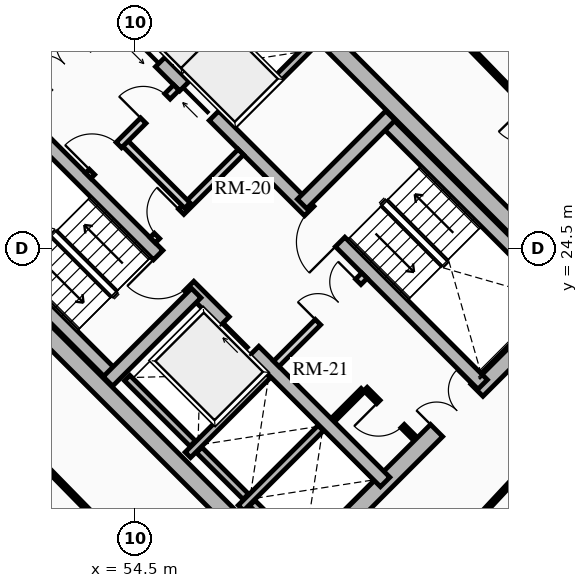
"""IFC4 building model, lengths in metres.
Left out: names, types, materials, properties, quantities, classifications, styles, units other than length and angle.
Written with IfcOpenShell. Run it as: python <this file> out.ifc"""

import sys

from ifc_helpers import new_model, si_unit, direction, frame, frame_2d, origin, place, context, subcontext, project, spatial, rectangle, extrude, source, transform, mapped, element, fill, save


model = new_model("IFC4")
c1 = context("Model", 3, precision=1e-05, world=origin(), true_north=direction((0.0, 1.0)))
c2 = subcontext(c1, "Body", "Model", "MODEL_VIEW")
j1 = project(units=[si_unit("LENGTHUNIT", "METRE"), si_unit("PLANEANGLEUNIT", "RADIAN")], contexts=[c1])
p1 = place(None, origin())
s1 = spatial("IfcSite", under=j1, at=p1, CompositionType="ELEMENT")
p2 = place(p1, origin())
s2 = spatial("IfcBuilding", under=s1, at=p2, CompositionType="ELEMENT")
p3 = place(p2, frame((0.0, 0.0, 96.34)))
s3 = spatial("IfcBuildingStorey", under=s2, at=p3, CompositionType="ELEMENT", Elevation=96.34)
for number, where, z_axis, x_axis in (
    (1, (58.737, 15.697, 0.0), (0.0, 0.0, 1.0), (-0.707, 0.707, 0.0)),
    (2, (66.303, 23.263, 0.0), (0.0, 0.0, 1.0), (-0.707, 0.707, 0.0)),
):
    element("IfcWall", number, at=place(p3, frame(where, z_axis=z_axis, x_axis=x_axis)), inside=s3, PredefinedType="SHEAR", context=c2, shape_type="SweptSolid", body=[
        extrude(rectangle(XDim=14.2, YDim=0.45, at=frame_2d((7.1, 0.0))), origin(), (0.0, 0.0, 1.0), 2.91),
    ])
p4 = place(p3, frame((58.578, 15.856, 0.0), z_axis=(0.0, 0.0, 1.0), x_axis=(0.707106781187, 0.707106781187, 0.0)))
e3 = element("IfcWall", 3, at=p4, inside=s3, PredefinedType="SHEAR", context=c2, shape_type="SweptSolid", body=[
    extrude(rectangle(XDim=10.7, YDim=0.45, at=frame_2d((5.35, 0.0))), origin(), (0.0, 0.0, 1.0), 2.91),
])
m1 = source(origin(), c2, "Body", "SweptSolid", [
    extrude(rectangle(XDim=1.5, YDim=2.02, at=frame_2d((0.75, 1.01))), frame((0.0, 0.235, 0.0), z_axis=(0.0, -1.0, 0.0), x_axis=(1.0, 0.0, 0.0)), (0.0, 0.0, 1.0), 0.47),
])
p5 = place(p4, frame((5.45, 0.0, 0.0)))
e4 = element("IfcOpeningElement", 4, at=p5, cuts=e3, PredefinedType="OPENING", context=c2, shape_type="MappedRepresentation", body=[
    mapped(m1, transform((0.0, 0.0, 0.0), x_axis=(1.0, 0.0, 0.0), y_axis=(0.0, 1.0, 0.0), z_axis=(0.0, 0.0, 1.0), scale=1.0)),
])
p6 = place(p3, frame((48.856, 25.578, 0.0), z_axis=(0.0, 0.0, 1.0), x_axis=(0.707106781187, 0.707106781187, 0.0)))
e5 = element("IfcWall", 5, at=p6, inside=s3, PredefinedType="SHEAR", context=c2, shape_type="SweptSolid", body=[
    extrude(rectangle(XDim=10.7, YDim=0.45, at=frame_2d((5.35, 0.0))), origin(), (0.0, 0.0, 1.0), 2.91),
])
p7 = place(p6, frame((4.6, 0.0, 0.0)))
e6 = element("IfcOpeningElement", 6, at=p7, cuts=e5, PredefinedType="OPENING", context=c2, shape_type="MappedRepresentation", body=[
    mapped(m1, transform((0.0, 0.0, 0.0), x_axis=(1.0, 0.0, 0.0), y_axis=(0.0, 1.0, 0.0), z_axis=(0.0, 0.0, 1.0), scale=1.0)),
])
p8 = place(p3, frame((61.078, 18.355, 0.0), z_axis=(0.0, 0.0, 1.0), x_axis=(-0.707106781187, 0.707106781187, 0.0)))
e7 = element("IfcWall", 7, at=p8, inside=s3, PredefinedType="SHEAR", context=c2, shape_type="SweptSolid", body=[
    extrude(rectangle(XDim=13.75, YDim=0.35, at=frame_2d((6.875, 0.0))), origin(), (0.0, 0.0, 1.0), 2.91),
])
m2 = source(origin(), c2, "Body", "SweptSolid", [
    extrude(rectangle(XDim=1.1, YDim=2.015, at=frame_2d((0.55, 1.007))), frame((0.0, 0.185, 0.0), z_axis=(0.0, -1.0, 0.0), x_axis=(1.0, 0.0, 0.0)), (0.0, 0.0, 1.0), 0.37),
])
p9 = place(p8, frame((4.875, 0.0, 0.0)))
e8 = element("IfcOpeningElement", 8, at=p9, cuts=e7, PredefinedType="OPENING", context=c2, shape_type="MappedRepresentation", body=[
    mapped(m2, transform((0.0, 0.0, 0.0), x_axis=(1.0, 0.0, 0.0), y_axis=(0.0, 1.0, 0.0), z_axis=(0.0, 0.0, 1.0), scale=1.0)),
])
m3 = source(origin(), c2, "Body", "SweptSolid", [
    extrude(rectangle(XDim=1.15, YDim=2.02, at=frame_2d((0.575, 1.01))), frame((0.0, 0.185, 0.0), z_axis=(0.0, -1.0, 0.0), x_axis=(1.0, 0.0, 0.0)), (0.0, 0.0, 1.0), 0.37),
])
p10 = place(p8, frame((7.295, 0.0, 0.0)))
e9 = element("IfcOpeningElement", 9, at=p10, cuts=e7, PredefinedType="OPENING", context=c2, shape_type="MappedRepresentation", body=[
    mapped(m3, transform((0.0, 0.0, 0.0), x_axis=(1.0, 0.0, 0.0), y_axis=(0.0, 1.0, 0.0), z_axis=(0.0, 0.0, 1.0), scale=1.0)),
])
p11 = place(p3, frame((63.645, 20.922, 0.0), z_axis=(0.0, 0.0, 1.0), x_axis=(-0.707106781187, 0.707106781187, 0.0)))
e10 = element("IfcWall", 10, at=p11, inside=s3, PredefinedType="SHEAR", context=c2, shape_type="SweptSolid", body=[
    extrude(rectangle(XDim=13.75, YDim=0.35, at=frame_2d((6.875, 0.0))), origin(), (0.0, 0.0, 1.0), 2.91),
])
p12 = place(p11, frame((10.0, 0.0, 0.0)))
e11 = element("IfcOpeningElement", 11, at=p12, cuts=e10, PredefinedType="OPENING", context=c2, shape_type="MappedRepresentation", body=[
    mapped(m2, transform((0.0, 0.0, 0.0), x_axis=(1.0, 0.0, 0.0), y_axis=(0.0, 1.0, 0.0), z_axis=(0.0, 0.0, 1.0), scale=1.0)),
])
p13 = place(p11, frame((12.0, 0.0, 0.0)))
e12 = element("IfcOpeningElement", 12, at=p13, cuts=e10, PredefinedType="OPENING", context=c2, shape_type="MappedRepresentation", body=[
    mapped(m2, transform((0.0, 0.0, 0.0), x_axis=(1.0, 0.0, 0.0), y_axis=(0.0, 1.0, 0.0), z_axis=(0.0, 0.0, 1.0), scale=1.0)),
])
p14 = place(p11, frame((5.305, 0.0, 0.0)))
e13 = element("IfcOpeningElement", 13, at=p14, cuts=e10, PredefinedType="OPENING", context=c2, shape_type="MappedRepresentation", body=[
    mapped(m3, transform((0.0, 0.0, 0.0), x_axis=(1.0, 0.0, 0.0), y_axis=(0.0, 1.0, 0.0), z_axis=(0.0, 0.0, 1.0), scale=1.0)),
])
p15 = place(p3, frame((53.922, 21.141, 0.0), z_axis=(0.0, 0.0, 1.0), x_axis=(-0.707088616009, 0.707124945897, 0.0)))
e14 = element("IfcWall", 14, at=p15, inside=s3, PredefinedType="SHEAR", context=c2, shape_type="SweptSolid", body=[
    extrude(rectangle(XDim=6.72, YDim=0.35, at=frame_2d((3.36, 0.0))), origin(), (0.0, 0.0, 1.0), 2.91),
])
p16 = place(p3, frame((53.784, 21.003, 0.0), z_axis=(0.0, 0.0, 1.0), x_axis=(0.707106781187, 0.707106781187, 0.0)))
e15 = element("IfcWall", 15, at=p16, inside=s3, PredefinedType="SHEAR", context=c2, shape_type="SweptSolid", body=[
    extrude(rectangle(XDim=3.285, YDim=0.35, at=frame_2d((1.643, 0.0))), origin(), (0.0, 0.0, 1.0), 2.91),
])
p17 = place(p3, frame((65.83, 23.107, 0.0), z_axis=(0.0, 0.0, 1.0), x_axis=(-0.707088616009, 0.707124945897, 0.0)))
e16 = element("IfcWall", 16, at=p17, inside=s3, PredefinedType="SHEAR", context=c2, shape_type="SweptSolid", body=[
    extrude(rectangle(XDim=6.72, YDim=0.35, at=frame_2d((3.36, 0.0))), origin(), (0.0, 0.0, 1.0), 2.91),
])
p18 = place(p3, frame((58.893, 25.674, 0.0), z_axis=(0.0, 0.0, 1.0), x_axis=(0.707106781187, 0.707106781187, 0.0)))
e17 = element("IfcWall", 17, at=p18, inside=s3, PredefinedType="SHEAR", context=c2, shape_type="SweptSolid", body=[
    extrude(rectangle(XDim=3.285, YDim=0.35, at=frame_2d((1.643, 0.0))), origin(), (0.0, 0.0, 1.0), 2.91),
])
p19 = place(p3, frame((55.888, 19.069, 0.0), z_axis=(0.0, 0.0, 1.0), x_axis=(0.707106781187, 0.707106781187, 0.0)))
e18 = element("IfcWall", 18, at=p19, inside=s3, PredefinedType="SHEAR", context=c2, shape_type="SweptSolid", body=[
    extrude(rectangle(XDim=2.97, YDim=0.2, at=frame_2d((1.485, 0.0))), origin(), (0.0, 0.0, 1.0), 2.91),
])
p20 = place(p3, frame((56.015, 19.366, 0.0), z_axis=(0.0, 0.0, 1.0), x_axis=(-0.707106781187, 0.707106781187, 0.0)))
e19 = element("IfcWall", 19, at=p20, inside=s3, PredefinedType="SHEAR", context=c2, shape_type="SweptSolid", body=[
    extrude(rectangle(XDim=2.44, YDim=0.2, at=frame_2d((1.22, 0.0))), origin(), (0.0, 0.0, 1.0), 2.91),
])
p21 = place(p3, frame((57.284, 17.673, 0.0), z_axis=(0.0, 0.0, 1.0), x_axis=(0.707147878904, 0.70706568108, 0.0)))
e20 = element("IfcWall", 20, at=p21, inside=s3, PredefinedType="SHEAR", context=c2, shape_type="SweptSolid", body=[
    extrude(rectangle(XDim=2.97, YDim=0.2, at=frame_2d((1.485, 0.0))), origin(), (0.0, 0.0, 1.0), 2.91),
])
p22 = place(p3, frame((57.412, 17.97, 0.0), z_axis=(0.0, 0.0, 1.0), x_axis=(-0.707106781187, 0.707106781187, 0.0)))
e21 = element("IfcWall", 21, at=p22, inside=s3, PredefinedType="SHEAR", context=c2, shape_type="SweptSolid", body=[
    extrude(rectangle(XDim=1.735, YDim=0.2, at=frame_2d((0.867, 0.0))), origin(), (0.0, 0.0, 1.0), 2.91),
])
p23 = place(p3, frame((58.737, 16.644, 0.0), z_axis=(0.0, 0.0, 1.0), x_axis=(-0.707032117043, 0.707181437447, 0.0)))
e22 = element("IfcWall", 22, at=p23, inside=s3, PredefinedType="SHEAR", context=c2, shape_type="SweptSolid", body=[
    extrude(rectangle(XDim=1.635, YDim=0.2, at=frame_2d((0.817, 0.0))), origin(), (0.0, 0.0, 1.0), 2.91),
])
p24 = place(p3, frame((57.062, 27.781, 0.0), z_axis=(0.0, 0.0, 1.0), x_axis=(0.707106781187, 0.707106781187, 0.0)))
e23 = element("IfcWall", 23, at=p24, inside=s3, PredefinedType="SHEAR", context=c2, shape_type="SweptSolid", body=[
    extrude(rectangle(XDim=2.97, YDim=0.2, at=frame_2d((1.485, 0.0))), origin(), (0.0, 0.0, 1.0), 2.91),
])
p25 = place(p3, frame((55.615, 29.227, 0.0), z_axis=(0.0, 0.0, 1.0), x_axis=(0.707147878904, 0.70706568108, 0.0)))
e24 = element("IfcWall", 24, at=p25, inside=s3, PredefinedType="SHEAR", context=c2, shape_type="SweptSolid", body=[
    extrude(rectangle(XDim=2.97, YDim=0.2, at=frame_2d((1.485, 0.0))), origin(), (0.0, 0.0, 1.0), 2.91),
])
p26 = place(p3, frame((58.214, 21.467, 0.0), z_axis=(0.0, 0.0, 1.0), x_axis=(0.707106781187, 0.707106781187, 0.0)))
e25 = element("IfcWall", 25, at=p26, inside=s3, PredefinedType="PARTITIONING", context=c2, shape_type="SweptSolid", body=[
    extrude(rectangle(XDim=3.28, YDim=0.2, at=frame_2d((1.64, 0.0))), origin(), (0.0, 0.0, 1.0), 2.655),
])
m4 = source(origin(), c2, "Body", "SweptSolid", [
    extrude(rectangle(XDim=1.5, YDim=2.02, at=frame_2d((0.75, 1.01))), frame((0.0, 0.11, 0.0), z_axis=(0.0, -1.0, 0.0), x_axis=(1.0, 0.0, 0.0)), (0.0, 0.0, 1.0), 0.22),
])
p27 = place(p26, frame((1.55, 0.0, 0.0)))
e26 = element("IfcOpeningElement", 26, at=p27, cuts=e25, PredefinedType="OPENING", context=c2, shape_type="MappedRepresentation", body=[
    mapped(m4, transform((0.0, 0.0, 0.0), x_axis=(1.0, 0.0, 0.0), y_axis=(0.0, 1.0, 0.0), z_axis=(0.0, 0.0, 1.0), scale=1.0)),
])
p28 = place(p3, frame((54.961, 24.719, 0.0), z_axis=(0.0, 0.0, 1.0), x_axis=(0.707106781187, 0.707106781187, 0.0)))
e27 = element("IfcWall", 27, at=p28, inside=s3, PredefinedType="PARTITIONING", context=c2, shape_type="SweptSolid", body=[
    extrude(rectangle(XDim=3.28, YDim=0.2, at=frame_2d((1.64, 0.0))), origin(), (0.0, 0.0, 1.0), 2.655),
])
m5 = source(origin(), c2, "Body", "SweptSolid", [
    extrude(rectangle(XDim=0.9, YDim=2.005, at=frame_2d((0.45, 1.002))), frame((0.0, 0.11, 0.0), z_axis=(0.0, -1.0, 0.0), x_axis=(1.0, 0.0, 0.0)), (0.0, 0.0, 1.0), 0.22),
])
p29 = place(p28, frame((0.16, 0.0, 0.0)))
e28 = element("IfcOpeningElement", 28, at=p29, cuts=e27, PredefinedType="OPENING", context=c2, shape_type="MappedRepresentation", body=[
    mapped(m5, transform((0.0, 0.0, 0.0), x_axis=(1.0, 0.0, 0.0), y_axis=(0.0, 1.0, 0.0), z_axis=(0.0, 0.0, 1.0), scale=1.0)),
])
p30 = place(p3, frame((55.874, 25.631, 0.0), z_axis=(0.0, 0.0, 1.0), x_axis=(-0.707157639372, 0.707055919343, 0.0)))
e29 = element("IfcWall", 29, at=p30, inside=s3, PredefinedType="PARTITIONING", context=c2, shape_type="SweptSolid", body=[
    extrude(rectangle(XDim=2.4, YDim=0.2, at=frame_2d((1.2, 0.0))), origin(), (0.0, 0.0, 1.0), 2.655),
])
p31 = place(p3, frame((53.264, 26.416, 0.0), z_axis=(0.0, 0.0, 1.0), x_axis=(0.707106781187, 0.707106781187, 0.0)))
e30 = element("IfcWall", 30, at=p31, inside=s3, PredefinedType="PARTITIONING", context=c2, shape_type="SweptSolid", body=[
    extrude(rectangle(XDim=3.28, YDim=0.2, at=frame_2d((1.64, 0.0))), origin(), (0.0, 0.0, 1.0), 2.655),
])
m6 = source(origin(), c2, "Body", "SweptSolid", [
    extrude(rectangle(XDim=1.0, YDim=2.015, at=frame_2d((0.5, 1.007))), frame((0.0, 0.11, 0.0), z_axis=(0.0, -1.0, 0.0), x_axis=(1.0, 0.0, 0.0)), (0.0, 0.0, 1.0), 0.22),
])
p32 = place(p31, frame((0.14, 0.0, 0.0)))
e31 = element("IfcOpeningElement", 31, at=p32, cuts=e30, PredefinedType="OPENING", context=c2, shape_type="MappedRepresentation", body=[
    mapped(m6, transform((0.0, 0.0, 0.0), x_axis=(1.0, 0.0, 0.0), y_axis=(0.0, 1.0, 0.0), z_axis=(0.0, 0.0, 1.0), scale=1.0)),
])
p33 = place(p31, frame((2.05, 0.0, 0.0)))
e32 = element("IfcOpeningElement", 32, at=p33, cuts=e30, PredefinedType="OPENING", context=c2, shape_type="MappedRepresentation", body=[
    mapped(m5, transform((0.0, 0.0, 0.0), x_axis=(1.0, 0.0, 0.0), y_axis=(0.0, 1.0, 0.0), z_axis=(0.0, 0.0, 1.0), scale=1.0)),
])
p34 = place(p3, frame((61.835, 19.529, 0.0), z_axis=(0.0, 0.0, 1.0), x_axis=(-0.707174592913, 0.707038962956, 0.0)))
e33 = element("IfcWall", 33, at=p34, inside=s3, PredefinedType="PARTITIONING", context=c2, shape_type="SweptSolid", body=[
    extrude(rectangle(XDim=1.8, YDim=0.125, at=frame_2d((0.9, 0.0))), origin(), (0.0, 0.0, 1.0), 2.655),
])
m7 = source(origin(), c2, "Body", "SweptSolid", [
    extrude(rectangle(XDim=0.9, YDim=2.005, at=frame_2d((0.45, 1.002))), frame((0.0, 0.073, 0.0), z_axis=(0.0, -1.0, 0.0), x_axis=(1.0, 0.0, 0.0)), (0.0, 0.0, 1.0), 0.145),
])
p35 = place(p34, frame((0.42, 0.0, 0.0)))
e34 = element("IfcOpeningElement", 34, at=p35, cuts=e33, PredefinedType="OPENING", context=c2, shape_type="MappedRepresentation", body=[
    mapped(m7, transform((0.0, 0.0, 0.0), x_axis=(1.0, 0.0, 0.0), y_axis=(0.0, 1.0, 0.0), z_axis=(0.0, 0.0, 1.0), scale=1.0)),
])
p36 = place(p3, frame((59.713, 19.996, 0.0), z_axis=(0.0, 0.0, 1.0), x_axis=(0.707217726, 0.706995818963, 0.0)))
e35 = element("IfcWall", 35, at=p36, inside=s3, PredefinedType="PARTITIONING", context=c2, shape_type="SweptSolid", body=[
    extrude(rectangle(XDim=1.1, YDim=0.125, at=frame_2d((0.55, 0.0))), origin(), (0.0, 0.0, 1.0), 2.655),
])
p37 = place(p3, frame((51.949, 18.949, 0.0), z_axis=(0.0, 0.0, 1.0), x_axis=(0.699840807936, -0.714298847506, 0.0)))
e36 = element("IfcWall", 36, at=p37, inside=s3, PredefinedType="MOVABLE", context=c2, shape_type="SweptSolid", body=[
    extrude(rectangle(XDim=6.13, YDim=0.1, at=frame_2d((3.065, 0.0))), origin(), (0.0, 0.0, 1.0), 2.225),
])
p38 = place(p3, frame((62.875, 16.709, 0.0), z_axis=(0.0, 0.0, 1.0), x_axis=(0.682290572861, 0.731081099595, 0.0)))
e37 = element("IfcWall", 37, at=p38, inside=s3, PredefinedType="MOVABLE", context=c2, shape_type="SweptSolid", body=[
    extrude(rectangle(XDim=6.6, YDim=0.1, at=frame_2d((3.3, 0.0))), origin(), (0.0, 0.0, 1.0), 2.225),
])
p39 = place(p3, frame((67.213, 25.768, 0.0), z_axis=(0.0, 0.0, 1.0), x_axis=(-0.696916079748, 0.717152687918, 0.0)))
e38 = element("IfcWall", 38, at=p39, inside=s3, PredefinedType="MOVABLE", context=c2, shape_type="SweptSolid", body=[
    extrude(rectangle(XDim=5.972, YDim=0.1, at=frame_2d((2.986, 0.0))), origin(), (0.0, 0.0, 1.0), 2.655),
])
m8 = source(origin(), c2, "Body", "SweptSolid", [
    extrude(rectangle(XDim=1.0, YDim=2.015, at=frame_2d((0.5, 1.007))), frame((0.0, 0.06, 0.0), z_axis=(0.0, -1.0, 0.0), x_axis=(1.0, 0.0, 0.0)), (0.0, 0.0, 1.0), 0.12),
])
p40 = place(p39, frame((2.486, 0.0, 0.0)))
e39 = element("IfcOpeningElement", 39, at=p40, cuts=e38, PredefinedType="OPENING", context=c2, shape_type="MappedRepresentation", body=[
    mapped(m8, transform((0.0, 0.0, 0.0), x_axis=(1.0, 0.0, 0.0), y_axis=(0.0, 1.0, 0.0), z_axis=(0.0, 0.0, 1.0), scale=1.0)),
])
m9 = source(origin(), c2, "Body", "SweptSolid", [
    extrude(rectangle(XDim=1.1, YDim=2.015, at=frame_2d((0.55, 1.007))), frame((0.0, 0.025, 0.0), z_axis=(0.0, -1.0, 0.0), x_axis=(1.0, 0.0, 0.0)), (0.0, 0.0, 1.0), 0.05),
])
p41 = place(p9, origin())
e40 = element("IfcDoor", 40, at=p41, inside=s3, OperationType="SLIDING_TO_RIGHT", PredefinedType="DOOR", context=c2, shape_type="MappedRepresentation", body=[
    mapped(m9, transform((0.0, 0.0, 0.0), x_axis=(1.0, 0.0, 0.0), y_axis=(0.0, 1.0, 0.0), z_axis=(0.0, 0.0, 1.0), scale=1.0)),
])
fill(e8, e40)
p42 = place(p12, origin())
e41 = element("IfcDoor", 41, at=p42, inside=s3, OperationType="SLIDING_TO_RIGHT", PredefinedType="DOOR", context=c2, shape_type="MappedRepresentation", body=[
    mapped(m9, transform((0.0, 0.0, 0.0), x_axis=(1.0, 0.0, 0.0), y_axis=(0.0, 1.0, 0.0), z_axis=(0.0, 0.0, 1.0), scale=1.0)),
])
fill(e11, e41)
p43 = place(p13, origin())
e42 = element("IfcDoor", 42, at=p43, inside=s3, OperationType="SLIDING_TO_LEFT", PredefinedType="DOOR", context=c2, shape_type="MappedRepresentation", body=[
    mapped(m9, transform((0.0, 0.0, 0.0), x_axis=(1.0, 0.0, 0.0), y_axis=(0.0, 1.0, 0.0), z_axis=(0.0, 0.0, 1.0), scale=1.0)),
])
fill(e12, e42)
m10 = source(origin(), c2, "Body", "SweptSolid", [
    extrude(rectangle(XDim=1.15, YDim=2.02, at=frame_2d((0.575, 1.01))), frame((0.0, 0.025, 0.0), z_axis=(0.0, -1.0, 0.0), x_axis=(1.0, 0.0, 0.0)), (0.0, 0.0, 1.0), 0.05),
])
p44 = place(p10, origin())
e43 = element("IfcDoor", 43, at=p44, inside=s3, OperationType="SINGLE_SWING_RIGHT", PredefinedType="DOOR", context=c2, shape_type="MappedRepresentation", body=[
    mapped(m10, transform((0.0, 0.0, 0.0), x_axis=(1.0, 0.0, 0.0), y_axis=(0.0, 1.0, 0.0), z_axis=(0.0, 0.0, 1.0), scale=1.0)),
])
fill(e9, e43)
p45 = place(p14, origin())
e44 = element("IfcDoor", 44, at=p45, inside=s3, OperationType="SINGLE_SWING_LEFT", PredefinedType="DOOR", context=c2, shape_type="MappedRepresentation", body=[
    mapped(m10, transform((0.0, 0.0, 0.0), x_axis=(1.0, 0.0, 0.0), y_axis=(0.0, 1.0, 0.0), z_axis=(0.0, 0.0, 1.0), scale=1.0)),
])
fill(e13, e44)
m11 = source(origin(), c2, "Body", "SweptSolid", [
    extrude(rectangle(XDim=1.5, YDim=2.02, at=frame_2d((0.75, 1.01))), frame((0.0, 0.025, 0.0), z_axis=(0.0, -1.0, 0.0), x_axis=(1.0, 0.0, 0.0)), (0.0, 0.0, 1.0), 0.05),
])
p46 = place(p7, origin())
e45 = element("IfcDoor", 45, at=p46, inside=s3, OperationType="DOUBLE_DOOR_SINGLE_SWING", PredefinedType="DOOR", context=c2, shape_type="MappedRepresentation", body=[
    mapped(m11, transform((0.0, 0.0, 0.0), x_axis=(1.0, 0.0, 0.0), y_axis=(0.0, 1.0, 0.0), z_axis=(0.0, 0.0, 1.0), scale=1.0)),
])
fill(e6, e45)
p47 = place(p5, origin())
e46 = element("IfcDoor", 46, at=p47, inside=s3, OperationType="DOUBLE_DOOR_SINGLE_SWING", PredefinedType="DOOR", context=c2, shape_type="MappedRepresentation", body=[
    mapped(m11, transform((0.0, 0.0, 0.0), x_axis=(1.0, 0.0, 0.0), y_axis=(0.0, 1.0, 0.0), z_axis=(0.0, 0.0, 1.0), scale=1.0)),
])
fill(e4, e46)
p48 = place(p27, origin())
e47 = element("IfcDoor", 47, at=p48, inside=s3, OperationType="DOUBLE_DOOR_SINGLE_SWING", PredefinedType="DOOR", context=c2, shape_type="MappedRepresentation", body=[
    mapped(m11, transform((0.0, 0.0, 0.0), x_axis=(1.0, 0.0, 0.0), y_axis=(0.0, 1.0, 0.0), z_axis=(0.0, 0.0, 1.0), scale=1.0)),
])
fill(e26, e47)
m12 = source(origin(), c2, "Body", "SweptSolid", [
    extrude(rectangle(XDim=0.9, YDim=2.005, at=frame_2d((0.45, 1.002))), frame((0.0, 0.025, 0.0), z_axis=(0.0, -1.0, 0.0), x_axis=(1.0, 0.0, 0.0)), (0.0, 0.0, 1.0), 0.05),
])
p49 = place(p29, origin())
e48 = element("IfcDoor", 48, at=p49, inside=s3, OperationType="SINGLE_SWING_RIGHT", PredefinedType="DOOR", context=c2, shape_type="MappedRepresentation", body=[
    mapped(m12, transform((0.0, 0.0, 0.0), x_axis=(1.0, 0.0, 0.0), y_axis=(0.0, 1.0, 0.0), z_axis=(0.0, 0.0, 1.0), scale=1.0)),
])
fill(e28, e48)
m13 = source(origin(), c2, "Body", "SweptSolid", [
    extrude(rectangle(XDim=1.0, YDim=2.015, at=frame_2d((0.5, 1.007))), frame((0.0, 0.025, 0.0), z_axis=(0.0, -1.0, 0.0), x_axis=(1.0, 0.0, 0.0)), (0.0, 0.0, 1.0), 0.05),
])
p50 = place(p32, origin())
e49 = element("IfcDoor", 49, at=p50, inside=s3, OperationType="SINGLE_SWING_LEFT", PredefinedType="DOOR", context=c2, shape_type="MappedRepresentation", body=[
    mapped(m13, transform((0.0, 0.0, 0.0), x_axis=(1.0, 0.0, 0.0), y_axis=(0.0, 1.0, 0.0), z_axis=(0.0, 0.0, 1.0), scale=1.0)),
])
fill(e31, e49)
p51 = place(p35, origin())
e50 = element("IfcDoor", 50, at=p51, inside=s3, OperationType="SINGLE_SWING_RIGHT", PredefinedType="DOOR", context=c2, shape_type="MappedRepresentation", body=[
    mapped(m12, transform((0.0, 0.0, 0.0), x_axis=(1.0, 0.0, 0.0), y_axis=(0.0, 1.0, 0.0), z_axis=(0.0, 0.0, 1.0), scale=1.0)),
])
fill(e34, e50)
p52 = place(p33, origin())
e51 = element("IfcDoor", 51, at=p52, inside=s3, OperationType="SINGLE_SWING_LEFT", PredefinedType="DOOR", context=c2, shape_type="MappedRepresentation", body=[
    mapped(m12, transform((0.0, 0.0, 0.0), x_axis=(1.0, 0.0, 0.0), y_axis=(0.0, 1.0, 0.0), z_axis=(0.0, 0.0, 1.0), scale=1.0)),
])
fill(e32, e51)
save(model, sys.argv[1])
